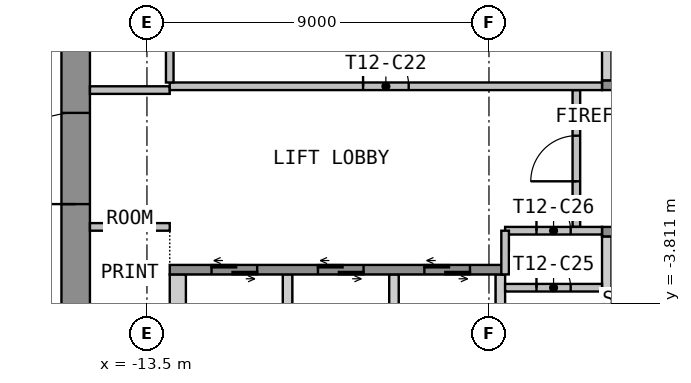
"""IFC4 building model, lengths in metres.
Left out: names, types, materials, properties, quantities, classifications, styles, units other than length and angle.
Written with IfcOpenShell. Run it as: python <this file> out.ifc"""

import sys

from ifc_helpers import new_model, si_unit, direction, frame, frame_2d, origin, place, context, subcontext, project, spatial, polyline, rectangle, outline, extrude, element, fill, save


model = new_model("IFC4")
c1 = context("Model", 3, precision=1e-05, world=origin(), true_north=direction((0.0, 1.0)))
c2 = subcontext(c1, "Body", "Model", "MODEL_VIEW")
j1 = project(units=[si_unit("LENGTHUNIT", "METRE"), si_unit("PLANEANGLEUNIT", "RADIAN")], contexts=[c1])
p1 = place(None, origin())
s1 = spatial("IfcSite", under=j1, at=p1, CompositionType="ELEMENT")
p2 = place(p1, origin())
s2 = spatial("IfcBuilding", under=s1, at=p2, CompositionType="ELEMENT")
p3 = place(p2, frame((0.0, 0.0, 167.7)))
s3 = spatial("IfcBuildingStorey", under=s2, at=p3, CompositionType="ELEMENT", Elevation=167.7)
p4 = place(p3, frame((-15.375, -12.75, 0.0), z_axis=(0.0, 0.0, 1.0), x_axis=(0.0, 1.0, 0.0)))
e1 = element("IfcWall", 1, at=p4, inside=s3, PredefinedType="SHEAR", context=c2, shape_type="SweptSolid", body=[
    extrude(rectangle(XDim=25.5, YDim=0.75, at=frame_2d((12.75, 0.0))), origin(), (0.0, 0.0, 1.0), 3.575),
])
p5 = place(p4, frame((11.55, 0.0, 0.0)))
e2 = element("IfcOpeningElement", 2, at=p5, cuts=e1, PredefinedType="OPENING", context=c2, shape_type="SweptSolid", body=[
    extrude(rectangle(XDim=2.4, YDim=2.1, at=frame_2d((1.2, 1.05))), frame((0.0, 0.385, 0.0), z_axis=(0.0, -1.0, 0.0), x_axis=(1.0, 0.0, 0.0)), (0.0, 0.0, 1.0), 0.77),
])
p6 = place(p3, origin())
e3 = element("IfcWall", 3, at=p6, inside=s3, PredefinedType="SHEAR", context=c2, shape_type="SweptSolid", body=[
    extrude(outline(polyline([(-1.525, 2.05), (-1.275, 2.05), (-1.275, 4.75), (-1.525, 4.75), (-1.525, 2.05)])), origin(), (0.0, 0.0, 1.0), 3.575),
])
p7 = place(p3, frame((-1.525, 1.925, 0.0), z_axis=(0.0, 0.0, 1.0), x_axis=(1.0, 0.0, 0.0)))
e4 = element("IfcWall", 4, at=p7, inside=s3, PredefinedType="SHEAR", context=c2, shape_type="SweptSolid", body=[
    extrude(rectangle(XDim=3.05, YDim=0.25, at=frame_2d((1.525, 0.0))), origin(), (0.0, 0.0, 1.0), 3.575),
])
p8 = place(p7, frame((0.925, 0.0, 0.0)))
e5 = element("IfcOpeningElement", 5, at=p8, cuts=e4, PredefinedType="OPENING", context=c2, shape_type="SweptSolid", body=[
    extrude(rectangle(XDim=1.2, YDim=2.1, at=frame_2d((0.6, 1.05))), frame((0.0, 0.135, 0.0), z_axis=(0.0, -1.0, 0.0), x_axis=(1.0, 0.0, 0.0)), (0.0, 0.0, 1.0), 0.27),
])
p9 = place(p3, origin())
e6 = element("IfcWall", 6, at=p9, inside=s3, PredefinedType="SHEAR", context=c2, shape_type="SweptSolid", body=[
    extrude(outline(polyline([(-12.9, -4.75), (-12.475, -4.75), (-12.475, -3.05), (-12.9, -3.05), (-12.9, -4.75)])), origin(), (0.0, 0.0, 1.0), 3.575),
])
p10 = place(p3, origin())
e7 = element("IfcWall", 7, at=p10, inside=s3, PredefinedType="SHEAR", context=c2, shape_type="SweptSolid", body=[
    extrude(outline(polyline([(-9.925, -4.75), (-9.675, -4.75), (-9.675, -3.05), (-9.925, -3.05), (-9.925, -4.75)])), origin(), (0.0, 0.0, 1.0), 3.575),
])
p11 = place(p3, origin())
e8 = element("IfcWall", 8, at=p11, inside=s3, PredefinedType="SHEAR", context=c2, shape_type="SweptSolid", body=[
    extrude(outline(polyline([(-7.125, -4.75), (-6.875, -4.75), (-6.875, -3.05), (-7.125, -3.05), (-7.125, -4.75)])), origin(), (0.0, 0.0, 1.0), 3.575),
])
p12 = place(p3, origin())
e9 = element("IfcWall", 9, at=p12, inside=s3, PredefinedType="SHEAR", context=c2, shape_type="SweptSolid", body=[
    extrude(outline(polyline([(-4.325, -4.75), (-4.075, -4.75), (-4.075, -3.05), (-4.325, -3.05), (-4.325, -4.75)])), origin(), (0.0, 0.0, 1.0), 3.575),
])
p13 = place(p3, origin())
e10 = element("IfcWall", 10, at=p13, inside=s3, PredefinedType="SHEAR", context=c2, shape_type="SweptSolid", body=[
    extrude(outline(polyline([(-1.525, -4.75), (-1.275, -4.75), (-1.275, -2.05), (-1.525, -2.05), (-1.525, -4.75)])), origin(), (0.0, 0.0, 1.0), 3.575),
])
p14 = place(p3, frame((-12.9, -2.925, 0.0), z_axis=(0.0, 0.0, 1.0), x_axis=(1.0, 0.0, 0.0)))
e11 = element("IfcWall", 11, at=p14, inside=s3, PredefinedType="SHEAR", context=c2, shape_type="SweptSolid", body=[
    extrude(rectangle(XDim=8.825, YDim=0.25, at=frame_2d((4.413, 0.0))), origin(), (0.0, 0.0, 1.0), 3.575),
])
p15 = place(p14, frame((1.1, 0.0, 0.0)))
e12 = element("IfcOpeningElement", 12, at=p15, cuts=e11, PredefinedType="OPENING", context=c2, shape_type="SweptSolid", body=[
    extrude(rectangle(XDim=1.2, YDim=2.1, at=frame_2d((0.6, 1.05))), frame((0.0, 0.135, 0.0), z_axis=(0.0, -1.0, 0.0), x_axis=(1.0, 0.0, 0.0)), (0.0, 0.0, 1.0), 0.27),
])
p16 = place(p14, frame((3.9, 0.0, 0.0)))
e13 = element("IfcOpeningElement", 13, at=p16, cuts=e11, PredefinedType="OPENING", context=c2, shape_type="SweptSolid", body=[
    extrude(rectangle(XDim=1.2, YDim=2.1, at=frame_2d((0.6, 1.05))), frame((0.0, 0.135, 0.0), z_axis=(0.0, -1.0, 0.0), x_axis=(1.0, 0.0, 0.0)), (0.0, 0.0, 1.0), 0.27),
])
p17 = place(p14, frame((6.7, 0.0, 0.0)))
e14 = element("IfcOpeningElement", 14, at=p17, cuts=e11, PredefinedType="OPENING", context=c2, shape_type="SweptSolid", body=[
    extrude(rectangle(XDim=1.2, YDim=2.1, at=frame_2d((0.6, 1.05))), frame((0.0, 0.135, 0.0), z_axis=(0.0, -1.0, 0.0), x_axis=(1.0, 0.0, 0.0)), (0.0, 0.0, 1.0), 0.27),
])
p18 = place(p3, frame((-1.525, -1.925, 0.0), z_axis=(0.0, 0.0, 1.0), x_axis=(1.0, 0.0, 0.0)))
e15 = element("IfcWall", 15, at=p18, inside=s3, PredefinedType="SHEAR", context=c2, shape_type="SweptSolid", body=[
    extrude(rectangle(XDim=14.425, YDim=0.25, at=frame_2d((7.212, 0.0))), origin(), (0.0, 0.0, 1.0), 3.575),
])
p19 = place(p18, frame((0.925, 0.0, 0.0)))
e16 = element("IfcOpeningElement", 16, at=p19, cuts=e15, PredefinedType="OPENING", context=c2, shape_type="SweptSolid", body=[
    extrude(rectangle(XDim=1.2, YDim=2.1, at=frame_2d((0.6, 1.05))), frame((0.0, 0.135, 0.0), z_axis=(0.0, -1.0, 0.0), x_axis=(1.0, 0.0, 0.0)), (0.0, 0.0, 1.0), 0.27),
])
p20 = place(p18, frame((3.725, 0.0, 0.0)))
e17 = element("IfcOpeningElement", 17, at=p20, cuts=e15, PredefinedType="OPENING", context=c2, shape_type="SweptSolid", body=[
    extrude(rectangle(XDim=1.2, YDim=2.1, at=frame_2d((0.6, 1.05))), frame((0.0, 0.135, 0.0), z_axis=(0.0, -1.0, 0.0), x_axis=(1.0, 0.0, 0.0)), (0.0, 0.0, 1.0), 0.27),
])
p21 = place(p3, frame((-2.2, -1.8, 0.0), z_axis=(0.0, 0.0, 1.0), x_axis=(0.0, 1.0, 0.0)))
e18 = element("IfcWall", 18, at=p21, inside=s3, PredefinedType="PARTITIONING", context=c2, shape_type="SweptSolid", body=[
    extrude(rectangle(XDim=3.6, YDim=0.2, at=frame_2d((1.8, 0.0))), origin(), (0.0, 0.0, 1.0), 3.575),
])
p22 = place(p21, frame((1.2, 0.0, 0.0)))
e19 = element("IfcOpeningElement", 19, at=p22, cuts=e18, PredefinedType="OPENING", context=c2, shape_type="SweptSolid", body=[
    extrude(rectangle(XDim=1.2, YDim=2.1, at=frame_2d((0.6, 1.05))), frame((0.0, 0.11, 0.0), z_axis=(0.0, -1.0, 0.0), x_axis=(1.0, 0.0, 0.0)), (0.0, 0.0, 1.0), 0.22),
])
for number, where, z_axis, x_axis in (
    (20, (-15.0, 1.8, 0.0), (0.0, 0.0, 1.0), (1.0, 0.0, 0.0)),
    (21, (-15.0, -1.8, 0.0), (0.0, 0.0, 1.0), (1.0, 0.0, 0.0)),
):
    element("IfcWall", number, at=place(p3, frame(where, z_axis=z_axis, x_axis=x_axis)), inside=s3, PredefinedType="PARTITIONING", context=c2, shape_type="SweptSolid", body=[
        extrude(rectangle(XDim=2.1, YDim=0.2, at=frame_2d((1.05, 0.0))), origin(), (0.0, 0.0, 1.0), 3.575),
    ])
p23 = place(p3, frame((-12.9, 1.9, 0.0), z_axis=(0.0, 0.0, 1.0), x_axis=(1.0, 0.0, 0.0)))
e22 = element("IfcWall", 22, at=p23, inside=s3, PredefinedType="PARTITIONING", context=c2, shape_type="SweptSolid", body=[
    extrude(rectangle(XDim=11.375, YDim=0.2, at=frame_2d((5.688, 0.0))), origin(), (0.0, 0.0, 1.0), 3.575),
])
p24 = place(p23, frame((5.087, 0.0, 0.0)))
e23 = element("IfcOpeningElement", 23, at=p24, cuts=e22, PredefinedType="OPENING", context=c2, shape_type="SweptSolid", body=[
    extrude(rectangle(XDim=1.2, YDim=2.1, at=frame_2d((0.6, 1.05))), frame((0.0, 0.11, 0.0), z_axis=(0.0, -1.0, 0.0), x_axis=(1.0, 0.0, 0.0)), (0.0, 0.0, 1.0), 0.22),
])
p25 = place(p3, frame((-12.9, 2.0, 0.0), z_axis=(0.0, 0.0, 1.0), x_axis=(0.0, 1.0, 0.0)))
e24 = element("IfcWall", 24, at=p25, inside=s3, PredefinedType="PARTITIONING", context=c2, shape_type="SweptSolid", body=[
    extrude(rectangle(XDim=2.8, YDim=0.2, at=frame_2d((1.4, 0.0))), origin(), (0.0, 0.0, 1.0), 3.575),
])
p26 = place(p3, frame((-4.075, -3.4, 0.0), z_axis=(0.0, 0.0, 1.0), x_axis=(1.0, 0.0, 0.0)))
e25 = element("IfcWall", 25, at=p26, inside=s3, PredefinedType="PARTITIONING", context=c2, shape_type="SweptSolid", body=[
    extrude(rectangle(XDim=2.55, YDim=0.2, at=frame_2d((1.275, 0.0))), origin(), (0.0, 0.0, 1.0), 3.575),
])
p27 = place(p26, frame((0.825, 0.0, 0.0)))
e26 = element("IfcOpeningElement", 26, at=p27, cuts=e25, PredefinedType="OPENING", context=c2, shape_type="SweptSolid", body=[
    extrude(rectangle(XDim=0.9, YDim=2.1, at=frame_2d((0.45, 1.05))), frame((0.0, 0.11, 0.0), z_axis=(0.0, -1.0, 0.0), x_axis=(1.0, 0.0, 0.0)), (0.0, 0.0, 1.0), 0.22),
])
p28 = place(p3, frame((-4.075, -1.9, 0.0), z_axis=(0.0, 0.0, 1.0), x_axis=(1.0, 0.0, 0.0)))
e27 = element("IfcWall", 27, at=p28, inside=s3, PredefinedType="PARTITIONING", context=c2, shape_type="SweptSolid", body=[
    extrude(rectangle(XDim=2.55, YDim=0.2, at=frame_2d((1.275, 0.0))), origin(), (0.0, 0.0, 1.0), 3.575),
])
p29 = place(p28, frame((0.825, 0.0, 0.0)))
e28 = element("IfcOpeningElement", 28, at=p29, cuts=e27, PredefinedType="OPENING", context=c2, shape_type="SweptSolid", body=[
    extrude(rectangle(XDim=0.9, YDim=2.1, at=frame_2d((0.45, 1.05))), frame((0.0, 0.11, 0.0), z_axis=(0.0, -1.0, 0.0), x_axis=(1.0, 0.0, 0.0)), (0.0, 0.0, 1.0), 0.22),
])
p30 = place(p3, frame((-4.075, -1.9, 0.0), z_axis=(0.0, 0.0, 1.0), x_axis=(0.0, -1.0, 0.0)))
e29 = element("IfcWall", 29, at=p30, inside=s3, PredefinedType="PARTITIONING", context=c2, shape_type="SweptSolid", body=[
    extrude(rectangle(XDim=1.15, YDim=0.2, at=frame_2d((0.575, 0.0))), origin(), (0.0, 0.0, 1.0), 3.575),
])
p31 = place(p5, origin())
e30 = element("IfcDoor", 30, at=p31, inside=s3, OperationType="DOUBLE_DOOR_DOUBLE_SWING", PredefinedType="DOOR", context=c2, shape_type="SweptSolid", body=[
    extrude(rectangle(XDim=2.4, YDim=2.1, at=frame_2d((1.2, 1.05))), frame((0.0, 0.025, 0.0), z_axis=(0.0, -1.0, 0.0), x_axis=(1.0, 0.0, 0.0)), (0.0, 0.0, 1.0), 0.05),
])
fill(e2, e30)
p32 = place(p15, origin())
e31 = element("IfcDoor", 31, at=p32, inside=s3, OperationType="DOUBLE_DOOR_SLIDING", PredefinedType="DOOR", context=c2, shape_type="SweptSolid", body=[
    extrude(rectangle(XDim=1.2, YDim=2.1, at=frame_2d((0.6, 1.05))), frame((0.0, 0.025, 0.0), z_axis=(0.0, -1.0, 0.0), x_axis=(1.0, 0.0, 0.0)), (0.0, 0.0, 1.0), 0.05),
])
fill(e12, e31)
p33 = place(p16, origin())
e32 = element("IfcDoor", 32, at=p33, inside=s3, OperationType="DOUBLE_DOOR_SLIDING", PredefinedType="DOOR", context=c2, shape_type="SweptSolid", body=[
    extrude(rectangle(XDim=1.2, YDim=2.1, at=frame_2d((0.6, 1.05))), frame((0.0, 0.025, 0.0), z_axis=(0.0, -1.0, 0.0), x_axis=(1.0, 0.0, 0.0)), (0.0, 0.0, 1.0), 0.05),
])
fill(e13, e32)
p34 = place(p17, origin())
e33 = element("IfcDoor", 33, at=p34, inside=s3, OperationType="DOUBLE_DOOR_SLIDING", PredefinedType="DOOR", context=c2, shape_type="SweptSolid", body=[
    extrude(rectangle(XDim=1.2, YDim=2.1, at=frame_2d((0.6, 1.05))), frame((0.0, 0.025, 0.0), z_axis=(0.0, -1.0, 0.0), x_axis=(1.0, 0.0, 0.0)), (0.0, 0.0, 1.0), 0.05),
])
fill(e14, e33)
p35 = place(p22, origin())
e34 = element("IfcDoor", 34, at=p35, inside=s3, OperationType="SINGLE_SWING_LEFT", PredefinedType="DOOR", context=c2, shape_type="SweptSolid", body=[
    extrude(rectangle(XDim=1.2, YDim=2.1, at=frame_2d((0.6, 1.05))), frame((0.0, 0.025, 0.0), z_axis=(0.0, -1.0, 0.0), x_axis=(1.0, 0.0, 0.0)), (0.0, 0.0, 1.0), 0.05),
])
fill(e19, e34)
p36 = place(p24, origin())
e35 = element("IfcDoor", 35, at=p36, inside=s3, OperationType="SINGLE_SWING_RIGHT", PredefinedType="DOOR", context=c2, shape_type="SweptSolid", body=[
    extrude(rectangle(XDim=1.2, YDim=2.1, at=frame_2d((0.6, 1.05))), frame((0.0, 0.025, 0.0), z_axis=(0.0, -1.0, 0.0), x_axis=(1.0, 0.0, 0.0)), (0.0, 0.0, 1.0), 0.05),
])
fill(e23, e35)
p37 = place(p27, origin())
e36 = element("IfcDoor", 36, at=p37, inside=s3, OperationType="SINGLE_SWING_LEFT", PredefinedType="DOOR", context=c2, shape_type="SweptSolid", body=[
    extrude(rectangle(XDim=0.9, YDim=2.1, at=frame_2d((0.45, 1.05))), frame((0.0, 0.025, 0.0), z_axis=(0.0, -1.0, 0.0), x_axis=(1.0, 0.0, 0.0)), (0.0, 0.0, 1.0), 0.05),
])
fill(e26, e36)
p38 = place(p29, origin())
e37 = element("IfcDoor", 37, at=p38, inside=s3, OperationType="SINGLE_SWING_LEFT", PredefinedType="DOOR", context=c2, shape_type="SweptSolid", body=[
    extrude(rectangle(XDim=0.9, YDim=2.1, at=frame_2d((0.45, 1.05))), frame((0.0, 0.025, 0.0), z_axis=(0.0, -1.0, 0.0), x_axis=(1.0, 0.0, 0.0)), (0.0, 0.0, 1.0), 0.05),
])
fill(e28, e37)
save(model, sys.argv[1])
